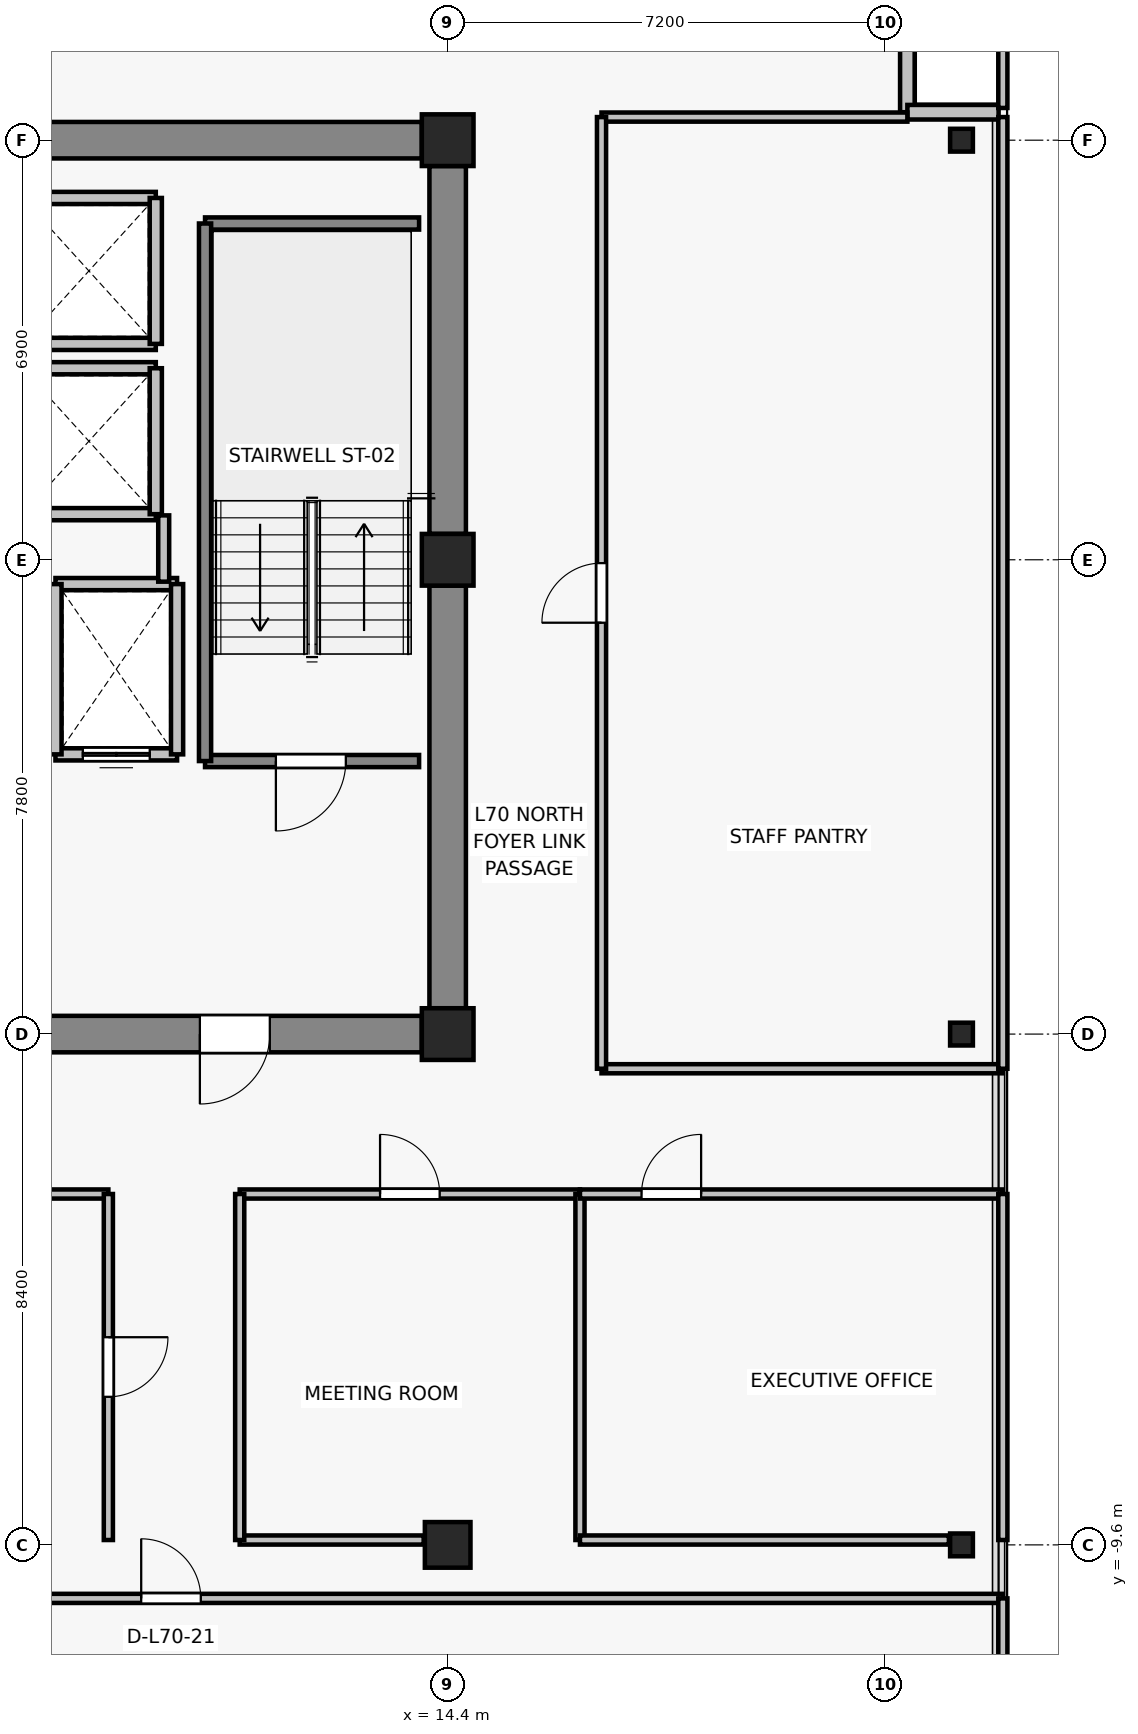
"""IFC4 building model, lengths in metres.
Left out: names, types, materials, properties, quantities, classifications, styles, units other than length and angle.
Written with IfcOpenShell. Run it as: python <this file> out.ifc"""

import sys

from ifc_helpers import new_model, si_unit, direction, frame, frame_2d, origin, origin_2d, place, context, subcontext, project, spatial, rectangle, i_section, extrude, source, transform, mapped, element, fill, save


model = new_model("IFC4")
c1 = context("Model", 3, precision=1e-05, world=origin(), true_north=direction((0.0, 1.0)))
c2 = subcontext(c1, "Body", "Model", "MODEL_VIEW")
j1 = project(units=[si_unit("LENGTHUNIT", "METRE"), si_unit("PLANEANGLEUNIT", "RADIAN")], contexts=[c1])
p1 = place(None, origin())
s1 = spatial("IfcSite", under=j1, at=p1, CompositionType="ELEMENT")
p2 = place(p1, origin())
s2 = spatial("IfcBuilding", under=s1, at=p2, CompositionType="ELEMENT")
p3 = place(p2, frame((0.0, 0.0, 248.5)))
s3 = spatial("IfcBuildingStorey", under=s2, at=p3, CompositionType="ELEMENT", Elevation=248.5)
for number, where, z_axis, x_axis in (
    (1, (14.4, -1.2, 0.0), (0.0, 0.0, 1.0), (1.0, 0.0, 0.0)),
    (2, (14.4, 6.6, 0.0), (0.0, 0.0, 1.0), (1.0, 0.0, 0.0)),
    (3, (14.4, 13.5, 0.0), (0.0, 0.0, 1.0), (1.0, 0.0, 0.0)),
):
    element("IfcColumn", number, at=place(p3, frame(where, z_axis=z_axis, x_axis=x_axis)), inside=s3, PredefinedType="COLUMN", context=c2, shape_type="SweptSolid", body=[
        extrude(rectangle(XDim=0.85, YDim=0.85, at=origin_2d()), origin(), (0.0, 0.0, 1.0), 3.3),
    ])
p4 = place(p3, frame((14.4, -9.6, 0.0), z_axis=(0.0, 0.0, 1.0), x_axis=(1.0, 0.0, 0.0)))
e4 = element("IfcColumn", 4, at=p4, inside=s3, PredefinedType="COLUMN", context=c2, shape_type="SweptSolid", body=[
    extrude(rectangle(XDim=0.75, YDim=0.75, at=origin_2d()), origin(), (0.0, 0.0, 1.0), 3.3),
])
for number, where, z_axis, x_axis in (
    (5, (22.85, -9.6, 0.0), (0.0, 0.0, 1.0), (1.0, 0.0, 0.0)),
    (6, (22.85, -1.2, 0.0), (0.0, 0.0, 1.0), (1.0, 0.0, 0.0)),
    (7, (22.85, 13.5, 0.0), (0.0, 0.0, 1.0), (1.0, 0.0, 0.0)),
):
    element("IfcColumn", number, at=place(p3, frame(where, z_axis=z_axis, x_axis=x_axis)), inside=s3, PredefinedType="COLUMN", context=c2, shape_type="SweptSolid", body=[
        extrude(i_section(OverallWidth=0.375, OverallDepth=0.375, WebThickness=0.017, FlangeThickness=0.027, FilletRadius=0.015, at=origin_2d()), origin(), (0.0, 0.0, 1.0), 3.3),
    ])
p5 = place(p3, frame((7.625, 13.5, 0.0), z_axis=(0.0, 0.0, 1.0), x_axis=(1.0, 0.0, 0.0)))
e8 = element("IfcWall", 8, at=p5, inside=s3, PredefinedType="SHEAR", context=c2, shape_type="SweptSolid", body=[
    extrude(rectangle(XDim=6.35, YDim=0.6, at=frame_2d((3.175, 0.0))), origin(), (0.0, 0.0, 1.0), 3.075),
])
p6 = place(p3, frame((14.4, -0.775, 0.0), z_axis=(0.0, 0.0, 1.0), x_axis=(0.0, 1.0, 0.0)))
e9 = element("IfcWall", 9, at=p6, inside=s3, PredefinedType="SHEAR", context=c2, shape_type="SweptSolid", body=[
    extrude(rectangle(XDim=6.95, YDim=0.6, at=frame_2d((3.475, 0.0))), origin(), (0.0, 0.0, 1.0), 3.075),
])
p7 = place(p3, frame((14.4, 7.025, 0.0), z_axis=(0.0, 0.0, 1.0), x_axis=(0.0, 1.0, 0.0)))
e10 = element("IfcWall", 10, at=p7, inside=s3, PredefinedType="SHEAR", context=c2, shape_type="SweptSolid", body=[
    extrude(rectangle(XDim=6.05, YDim=0.6, at=frame_2d((3.025, 0.0))), origin(), (0.0, 0.0, 1.0), 3.075),
])
p8 = place(p3, frame((13.975, -1.2, 0.0), z_axis=(0.0, 0.0, 1.0), x_axis=(-1.0, 0.0, 0.0)))
e11 = element("IfcWall", 11, at=p8, inside=s3, PredefinedType="SHEAR", context=c2, shape_type="SweptSolid", body=[
    extrude(rectangle(XDim=6.35, YDim=0.6, at=frame_2d((3.175, 0.0))), origin(), (0.0, 0.0, 1.0), 3.075),
])
p9 = place(p8, frame((2.5, 0.0, 0.0)))
e12 = element("IfcOpeningElement", 12, at=p9, cuts=e11, PredefinedType="OPENING", context=c2, shape_type="SweptSolid", body=[
    extrude(rectangle(XDim=1.15, YDim=2.15, at=frame_2d((0.575, 1.075))), frame((0.0, 0.31, 0.0), z_axis=(0.0, -1.0, 0.0), x_axis=(1.0, 0.0, 0.0)), (0.0, 0.0, 1.0), 0.62),
])
for number, where, z_axis, x_axis in (
    (13, (21.96, 13.96, 0.0), (0.0, 0.0, 1.0), (0.0, 1.0, 0.0)),
    (14, (23.46, 13.96, 0.0), (0.0, 0.0, 1.0), (-1.0, 0.0, 0.0)),
):
    element("IfcWall", number, at=place(p3, frame(where, z_axis=z_axis, x_axis=x_axis)), inside=s3, PredefinedType="SOLIDWALL", context=c2, shape_type="SweptSolid", body=[
        extrude(rectangle(XDim=1.5, YDim=0.24, at=frame_2d((0.75, 0.0))), origin(), (0.0, 0.0, 1.0), 3.075),
    ])
p10 = place(p3, frame((9.95, 3.4, 0.0), z_axis=(0.0, 0.0, 1.0), x_axis=(-1.0, 0.0, 0.0)))
e15 = element("IfcWall", 15, at=p10, inside=s3, PredefinedType="SOLIDWALL", context=c2, shape_type="SweptSolid", body=[
    extrude(rectangle(XDim=2.0, YDim=0.2, at=frame_2d((1.0, 0.0))), origin(), (0.0, 0.0, 1.0), 3.075),
])
p11 = place(p10, frame((0.45, 0.0, 0.0)))
e16 = element("IfcOpeningElement", 16, at=p11, cuts=e15, PredefinedType="OPENING", context=c2, shape_type="SweptSolid", body=[
    extrude(rectangle(XDim=1.1, YDim=2.2, at=frame_2d((0.55, 1.1))), frame((0.0, 0.11, 0.0), z_axis=(0.0, -1.0, 0.0), x_axis=(1.0, 0.0, 0.0)), (0.0, 0.0, 1.0), 0.22),
])
p12 = place(p3, frame((7.95, 6.2, 0.0), z_axis=(0.0, 0.0, 1.0), x_axis=(1.0, 0.0, 0.0)))
e17 = element("IfcWall", 17, at=p12, inside=s3, PredefinedType="SOLIDWALL", context=c2, shape_type="SweptSolid", body=[
    extrude(rectangle(XDim=2.0, YDim=0.2, at=frame_2d((1.0, 0.0))), origin(), (0.0, 0.0, 1.0), 3.075),
])
for number, where, z_axis, x_axis in (
    (18, (7.95, 3.4, 0.0), (0.0, 0.0, 1.0), (0.0, 1.0, 0.0)),
    (19, (9.95, 6.2, 0.0), (0.0, 0.0, 1.0), (0.0, -1.0, 0.0)),
):
    element("IfcWall", number, at=place(p3, frame(where, z_axis=z_axis, x_axis=x_axis)), inside=s3, PredefinedType="SOLIDWALL", context=c2, shape_type="SweptSolid", body=[
        extrude(rectangle(XDim=2.8, YDim=0.2, at=frame_2d((1.4, 0.0))), origin(), (0.0, 0.0, 1.0), 3.075),
    ])
for number, where, z_axis, x_axis in (
    (20, (9.6, 7.35, 0.0), (0.0, 0.0, 1.0), (-1.0, 0.0, 0.0)),
    (21, (7.4, 9.75, 0.0), (0.0, 0.0, 1.0), (1.0, 0.0, 0.0)),
):
    element("IfcWall", number, at=place(p3, frame(where, z_axis=z_axis, x_axis=x_axis)), inside=s3, PredefinedType="SOLIDWALL", context=c2, shape_type="SweptSolid", body=[
        extrude(rectangle(XDim=2.2, YDim=0.2, at=frame_2d((1.1, 0.0))), origin(), (0.0, 0.0, 1.0), 2.615),
    ])
p13 = place(p3, frame((9.6, 9.75, 0.0), z_axis=(0.0, 0.0, 1.0), x_axis=(0.0, -1.0, 0.0)))
e22 = element("IfcWall", 22, at=p13, inside=s3, PredefinedType="SOLIDWALL", context=c2, shape_type="SweptSolid", body=[
    extrude(rectangle(XDim=2.4, YDim=0.2, at=frame_2d((1.2, 0.0))), origin(), (0.0, 0.0, 1.0), 3.075),
])
for number, where, z_axis, x_axis in (
    (23, (9.6, 10.15, 0.0), (0.0, 0.0, 1.0), (-1.0, 0.0, 0.0)),
    (24, (7.4, 12.55, 0.0), (0.0, 0.0, 1.0), (1.0, 0.0, 0.0)),
):
    element("IfcWall", number, at=place(p3, frame(where, z_axis=z_axis, x_axis=x_axis)), inside=s3, PredefinedType="SOLIDWALL", context=c2, shape_type="SweptSolid", body=[
        extrude(rectangle(XDim=2.2, YDim=0.2, at=frame_2d((1.1, 0.0))), origin(), (0.0, 0.0, 1.0), 2.615),
    ])
p14 = place(p3, frame((9.6, 12.55, 0.0), z_axis=(0.0, 0.0, 1.0), x_axis=(0.0, -1.0, 0.0)))
e25 = element("IfcWall", 25, at=p14, inside=s3, PredefinedType="SOLIDWALL", context=c2, shape_type="SweptSolid", body=[
    extrude(rectangle(XDim=2.4, YDim=0.2, at=frame_2d((1.2, 0.0))), origin(), (0.0, 0.0, 1.0), 3.075),
])
p15 = place(p3, frame((13.93, 3.29, 0.0), z_axis=(0.0, 0.0, 1.0), x_axis=(-1.0, 0.0, 0.0)))
e26 = element("IfcWall", 26, at=p15, inside=s3, PredefinedType="SOLIDWALL", context=c2, shape_type="SweptSolid", body=[
    extrude(rectangle(XDim=3.52, YDim=0.2, at=frame_2d((1.76, 0.0))), origin(), (0.0, 0.0, 1.0), 3.075),
])
p16 = place(p15, frame((1.205, 0.0, 0.0)))
e27 = element("IfcOpeningElement", 27, at=p16, cuts=e26, PredefinedType="OPENING", context=c2, shape_type="SweptSolid", body=[
    extrude(rectangle(XDim=1.15, YDim=2.15, at=frame_2d((0.575, 1.075))), frame((0.0, 0.11, 0.0), z_axis=(0.0, -1.0, 0.0), x_axis=(1.0, 0.0, 0.0)), (0.0, 0.0, 1.0), 0.22),
])
p17 = place(p3, frame((10.41, 12.13, 0.0), z_axis=(0.0, 0.0, 1.0), x_axis=(1.0, 0.0, 0.0)))
e28 = element("IfcWall", 28, at=p17, inside=s3, PredefinedType="SOLIDWALL", context=c2, shape_type="SweptSolid", body=[
    extrude(rectangle(XDim=3.52, YDim=0.2, at=frame_2d((1.76, 0.0))), origin(), (0.0, 0.0, 1.0), 3.075),
])
p18 = place(p3, frame((10.41, 3.29, 0.0), z_axis=(0.0, 0.0, 1.0), x_axis=(0.0, 1.0, 0.0)))
e29 = element("IfcWall", 29, at=p18, inside=s3, PredefinedType="SOLIDWALL", context=c2, shape_type="SweptSolid", body=[
    extrude(rectangle(XDim=8.84, YDim=0.2, at=frame_2d((4.42, 0.0))), origin(), (0.0, 0.0, 1.0), 3.075),
])
p19 = place(p3, frame((9.73, 7.33, 0.0), z_axis=(0.0, 0.0, 1.0), x_axis=(0.0, -1.0, 0.0)))
e30 = element("IfcWall", 30, at=p19, inside=s3, PredefinedType="PARTITIONING", context=c2, shape_type="SweptSolid", body=[
    extrude(rectangle(XDim=1.09, YDim=0.18, at=frame_2d((0.545, 0.0))), origin(), (0.0, 0.0, 1.0), 3.075),
])
p20 = place(p3, frame((14.005, -9.52, 0.0), z_axis=(0.0, 0.0, 1.0), x_axis=(-1.0, 0.0, 0.0)))
e31 = element("IfcWall", 31, at=p20, inside=s3, PredefinedType="PARTITIONING", context=c2, shape_type="SweptSolid", body=[
    extrude(rectangle(XDim=3.025, YDim=0.15, at=frame_2d((1.512, 0.0))), origin(), (0.0, 0.0, 1.0), 2.615),
])
p21 = place(p3, frame((10.98, -3.83, 0.0), z_axis=(0.0, 0.0, 1.0), x_axis=(1.0, 0.0, 0.0)))
e32 = element("IfcWall", 32, at=p21, inside=s3, PredefinedType="PARTITIONING", context=c2, shape_type="SweptSolid", body=[
    extrude(rectangle(XDim=5.596, YDim=0.15, at=frame_2d((2.798, 0.0))), origin(), (0.0, 0.0, 1.0), 2.615),
])
p22 = place(p21, frame((2.308, 0.0, 0.0)))
e33 = element("IfcOpeningElement", 33, at=p22, cuts=e32, PredefinedType="OPENING", context=c2, shape_type="SweptSolid", body=[
    extrude(rectangle(XDim=0.98, YDim=2.15, at=frame_2d((0.49, 1.075))), frame((0.0, 0.085, 0.0), z_axis=(0.0, -1.0, 0.0), x_axis=(1.0, 0.0, 0.0)), (0.0, 0.0, 1.0), 0.17),
])
for number, where, z_axis, x_axis in (
    (34, (10.98, -9.52, 0.0), (0.0, 0.0, 1.0), (0.0, 1.0, 0.0)),
    (35, (16.576, -3.83, 0.0), (0.0, 0.0, 1.0), (0.0, -1.0, 0.0)),
):
    element("IfcWall", number, at=place(p3, frame(where, z_axis=z_axis, x_axis=x_axis)), inside=s3, PredefinedType="PARTITIONING", context=c2, shape_type="SweptSolid", body=[
        extrude(rectangle(XDim=5.69, YDim=0.15, at=frame_2d((2.845, 0.0))), origin(), (0.0, 0.0, 1.0), 2.615),
    ])
p23 = place(p3, frame((22.643, -9.52, 0.0), z_axis=(0.0, 0.0, 1.0), x_axis=(-1.0, 0.0, 0.0)))
e36 = element("IfcWall", 36, at=p23, inside=s3, PredefinedType="PARTITIONING", context=c2, shape_type="SweptSolid", body=[
    extrude(rectangle(XDim=6.067, YDim=0.15, at=frame_2d((3.033, 0.0))), origin(), (0.0, 0.0, 1.0), 2.615),
])
p24 = place(p3, frame((16.576, -3.83, 0.0), z_axis=(0.0, 0.0, 1.0), x_axis=(1.0, 0.0, 0.0)))
e37 = element("IfcWall", 37, at=p24, inside=s3, PredefinedType="PARTITIONING", context=c2, shape_type="SweptSolid", body=[
    extrude(rectangle(XDim=6.954, YDim=0.15, at=frame_2d((3.477, 0.0))), origin(), (0.0, 0.0, 1.0), 2.765),
])
p25 = place(p24, frame((1.012, 0.0, 0.0)))
e38 = element("IfcOpeningElement", 38, at=p25, cuts=e37, PredefinedType="OPENING", context=c2, shape_type="SweptSolid", body=[
    extrude(rectangle(XDim=0.98, YDim=2.15, at=frame_2d((0.49, 1.075))), frame((0.0, 0.085, 0.0), z_axis=(0.0, -1.0, 0.0), x_axis=(1.0, 0.0, 0.0)), (0.0, 0.0, 1.0), 0.17),
])
p26 = place(p3, frame((23.53, -3.83, 0.0), z_axis=(0.0, 0.0, 1.0), x_axis=(0.0, -1.0, 0.0)))
e39 = element("IfcWall", 39, at=p26, inside=s3, PredefinedType="PARTITIONING", context=c2, shape_type="SweptSolid", body=[
    extrude(rectangle(XDim=5.69, YDim=0.15, at=frame_2d((2.845, 0.0))), origin(), (0.0, 0.0, 1.0), 2.665),
])
p27 = place(p3, frame((3.32, -10.48, 0.0), z_axis=(0.0, 0.0, 1.0), x_axis=(1.0, 0.0, 0.0)))
e40 = element("IfcWall", 40, at=p27, inside=s3, PredefinedType="PARTITIONING", context=c2, shape_type="SweptSolid", body=[
    extrude(rectangle(XDim=20.21, YDim=0.15, at=frame_2d((10.105, 0.0))), origin(), (0.0, 0.0, 1.0), 2.615),
])
p28 = place(p27, frame((6.04, 0.0, 0.0)))
e41 = element("IfcOpeningElement", 41, at=p28, cuts=e40, PredefinedType="OPENING", context=c2, shape_type="SweptSolid", body=[
    extrude(rectangle(XDim=0.98, YDim=2.15, at=frame_2d((0.49, 1.075))), frame((0.0, 0.085, 0.0), z_axis=(0.0, -1.0, 0.0), x_axis=(1.0, 0.0, 0.0)), (0.0, 0.0, 1.0), 0.17),
])
p29 = place(p3, frame((23.53, -10.48, 0.0), z_axis=(0.0, 0.0, 1.0), x_axis=(0.0, -1.0, 0.0)))
e42 = element("IfcWall", 42, at=p29, inside=s3, PredefinedType="PARTITIONING", context=c2, shape_type="SweptSolid", body=[
    extrude(rectangle(XDim=6.55, YDim=0.15, at=frame_2d((3.275, 0.0))), origin(), (0.0, 0.0, 1.0), 3.075),
])
p30 = place(p3, frame((5.48, -3.83, 0.0), z_axis=(0.0, 0.0, 1.0), x_axis=(1.0, 0.0, 0.0)))
e43 = element("IfcWall", 43, at=p30, inside=s3, PredefinedType="PARTITIONING", context=c2, shape_type="SweptSolid", body=[
    extrude(rectangle(XDim=3.34, YDim=0.15, at=frame_2d((1.67, 0.0))), origin(), (0.0, 0.0, 1.0), 2.615),
])
p31 = place(p3, frame((8.82, -3.83, 0.0), z_axis=(0.0, 0.0, 1.0), x_axis=(0.0, -1.0, 0.0)))
e44 = element("IfcWall", 44, at=p31, inside=s3, PredefinedType="PARTITIONING", context=c2, shape_type="SweptSolid", body=[
    extrude(rectangle(XDim=5.69, YDim=0.15, at=frame_2d((2.845, 0.0))), origin(), (0.0, 0.0, 1.0), 2.615),
])
p32 = place(p31, frame((2.355, 0.0, 0.0)))
e45 = element("IfcOpeningElement", 45, at=p32, cuts=e44, PredefinedType="OPENING", context=c2, shape_type="SweptSolid", body=[
    extrude(rectangle(XDim=0.98, YDim=2.15, at=frame_2d((0.49, 1.075))), frame((0.0, 0.085, 0.0), z_axis=(0.0, -1.0, 0.0), x_axis=(1.0, 0.0, 0.0)), (0.0, 0.0, 1.0), 0.17),
])
p33 = place(p3, frame((23.53, -1.77, 0.0), z_axis=(0.0, 0.0, 1.0), x_axis=(-1.0, 0.0, 0.0)))
e46 = element("IfcWall", 46, at=p33, inside=s3, PredefinedType="PARTITIONING", context=c2, shape_type="SweptSolid", body=[
    extrude(rectangle(XDim=6.6, YDim=0.15, at=frame_2d((3.3, 0.0))), origin(), (0.0, 0.0, 1.0), 2.765),
])
p34 = place(p3, frame((16.93, 13.88, 0.0), z_axis=(0.0, 0.0, 1.0), x_axis=(1.0, 0.0, 0.0)))
e47 = element("IfcWall", 47, at=p34, inside=s3, PredefinedType="PARTITIONING", context=c2, shape_type="SweptSolid", body=[
    extrude(rectangle(XDim=5.03, YDim=0.15, at=frame_2d((2.515, 0.0))), origin(), (0.0, 0.0, 1.0), 3.075),
])
p35 = place(p3, frame((16.93, -1.77, 0.0), z_axis=(0.0, 0.0, 1.0), x_axis=(0.0, 1.0, 0.0)))
e48 = element("IfcWall", 48, at=p35, inside=s3, PredefinedType="PARTITIONING", context=c2, shape_type="SweptSolid", body=[
    extrude(rectangle(XDim=15.65, YDim=0.15, at=frame_2d((7.825, 0.0))), origin(), (0.0, 0.0, 1.0), 2.615),
])
p36 = place(p35, frame((7.335, 0.0, 0.0)))
e49 = element("IfcOpeningElement", 49, at=p36, cuts=e48, PredefinedType="OPENING", context=c2, shape_type="SweptSolid", body=[
    extrude(rectangle(XDim=0.98, YDim=2.15, at=frame_2d((0.49, 1.075))), frame((0.0, 0.085, 0.0), z_axis=(0.0, -1.0, 0.0), x_axis=(1.0, 0.0, 0.0)), (0.0, 0.0, 1.0), 0.17),
])
p37 = place(p3, frame((23.53, 13.88, 0.0), z_axis=(0.0, 0.0, 1.0), x_axis=(0.0, -1.0, 0.0)))
e50 = element("IfcWall", 50, at=p37, inside=s3, PredefinedType="PARTITIONING", context=c2, shape_type="SweptSolid", body=[
    extrude(rectangle(XDim=15.65, YDim=0.15, at=frame_2d((7.825, 0.0))), origin(), (0.0, 0.0, 1.0), 3.075),
])
p38 = place(p3, frame((23.53, 17.03, 0.0), z_axis=(0.0, 0.0, 1.0), x_axis=(0.0, -1.0, 0.0)))
e51 = element("IfcWall", 51, at=p38, inside=s3, PredefinedType="PARTITIONING", context=c2, shape_type="SweptSolid", body=[
    extrude(rectangle(XDim=3.0, YDim=0.15, at=frame_2d((1.5, 0.0))), origin(), (0.0, 0.0, 1.0), 3.075),
])
m1 = source(origin(), c2, "Body", "SweptSolid", [
    extrude(rectangle(XDim=1.1, YDim=2.2, at=frame_2d((0.55, 1.1))), frame((0.0, 0.025, 0.0), z_axis=(0.0, -1.0, 0.0), x_axis=(1.0, 0.0, 0.0)), (0.0, 0.0, 1.0), 0.05),
])
p39 = place(p11, origin())
e52 = element("IfcDoor", 52, at=p39, inside=s3, OperationType="DOUBLE_DOOR_SLIDING", PredefinedType="DOOR", context=c2, shape_type="MappedRepresentation", body=[
    mapped(m1, transform((0.0, 0.0, 0.0), x_axis=(1.0, 0.0, 0.0), y_axis=(0.0, 1.0, 0.0), z_axis=(0.0, 0.0, 1.0), scale=1.0)),
])
fill(e16, e52)
m2 = source(origin(), c2, "Body", "SweptSolid", [
    extrude(rectangle(XDim=1.15, YDim=2.15, at=frame_2d((0.575, 1.075))), frame((0.0, 0.025, 0.0), z_axis=(0.0, -1.0, 0.0), x_axis=(1.0, 0.0, 0.0)), (0.0, 0.0, 1.0), 0.05),
])
p40 = place(p16, origin())
e53 = element("IfcDoor", 53, at=p40, inside=s3, OperationType="SINGLE_SWING_RIGHT", PredefinedType="DOOR", context=c2, shape_type="MappedRepresentation", body=[
    mapped(m2, transform((0.0, 0.0, 0.0), x_axis=(1.0, 0.0, 0.0), y_axis=(0.0, 1.0, 0.0), z_axis=(0.0, 0.0, 1.0), scale=1.0)),
])
fill(e27, e53)
p41 = place(p9, origin())
e54 = element("IfcDoor", 54, at=p41, inside=s3, OperationType="SINGLE_SWING_RIGHT", PredefinedType="DOOR", context=c2, shape_type="MappedRepresentation", body=[
    mapped(m2, transform((0.0, 0.0, 0.0), x_axis=(1.0, 0.0, 0.0), y_axis=(0.0, 1.0, 0.0), z_axis=(0.0, 0.0, 1.0), scale=1.0)),
])
fill(e12, e54)
m3 = source(origin(), c2, "Body", "SweptSolid", [
    extrude(rectangle(XDim=0.98, YDim=2.15, at=frame_2d((0.49, 1.075))), frame((0.0, 0.025, 0.0), z_axis=(0.0, -1.0, 0.0), x_axis=(1.0, 0.0, 0.0)), (0.0, 0.0, 1.0), 0.05),
])
p42 = place(p22, origin())
e55 = element("IfcDoor", 55, at=p42, inside=s3, OperationType="SINGLE_SWING_LEFT", PredefinedType="DOOR", context=c2, shape_type="MappedRepresentation", body=[
    mapped(m3, transform((0.0, 0.0, 0.0), x_axis=(1.0, 0.0, 0.0), y_axis=(0.0, 1.0, 0.0), z_axis=(0.0, 0.0, 1.0), scale=1.0)),
])
fill(e33, e55)
p43 = place(p25, origin())
e56 = element("IfcDoor", 56, at=p43, inside=s3, OperationType="SINGLE_SWING_RIGHT", PredefinedType="DOOR", context=c2, shape_type="MappedRepresentation", body=[
    mapped(m3, transform((0.0, 0.0, 0.0), x_axis=(1.0, 0.0, 0.0), y_axis=(0.0, 1.0, 0.0), z_axis=(0.0, 0.0, 1.0), scale=1.0)),
])
fill(e38, e56)
p44 = place(p28, origin())
e57 = element("IfcDoor", 57, at=p44, inside=s3, OperationType="SINGLE_SWING_LEFT", PredefinedType="DOOR", context=c2, shape_type="MappedRepresentation", body=[
    mapped(m3, transform((0.0, 0.0, 0.0), x_axis=(1.0, 0.0, 0.0), y_axis=(0.0, 1.0, 0.0), z_axis=(0.0, 0.0, 1.0), scale=1.0)),
])
fill(e41, e57)
p45 = place(p32, origin())
e58 = element("IfcDoor", 58, at=p45, inside=s3, OperationType="SINGLE_SWING_LEFT", PredefinedType="DOOR", context=c2, shape_type="MappedRepresentation", body=[
    mapped(m3, transform((0.0, 0.0, 0.0), x_axis=(1.0, 0.0, 0.0), y_axis=(0.0, 1.0, 0.0), z_axis=(0.0, 0.0, 1.0), scale=1.0)),
])
fill(e45, e58)
p46 = place(p36, origin())
e59 = element("IfcDoor", 59, at=p46, inside=s3, OperationType="SINGLE_SWING_LEFT", PredefinedType="DOOR", context=c2, shape_type="MappedRepresentation", body=[
    mapped(m3, transform((0.0, 0.0, 0.0), x_axis=(1.0, 0.0, 0.0), y_axis=(0.0, 1.0, 0.0), z_axis=(0.0, 0.0, 1.0), scale=1.0)),
])
fill(e49, e59)
save(model, sys.argv[1])
